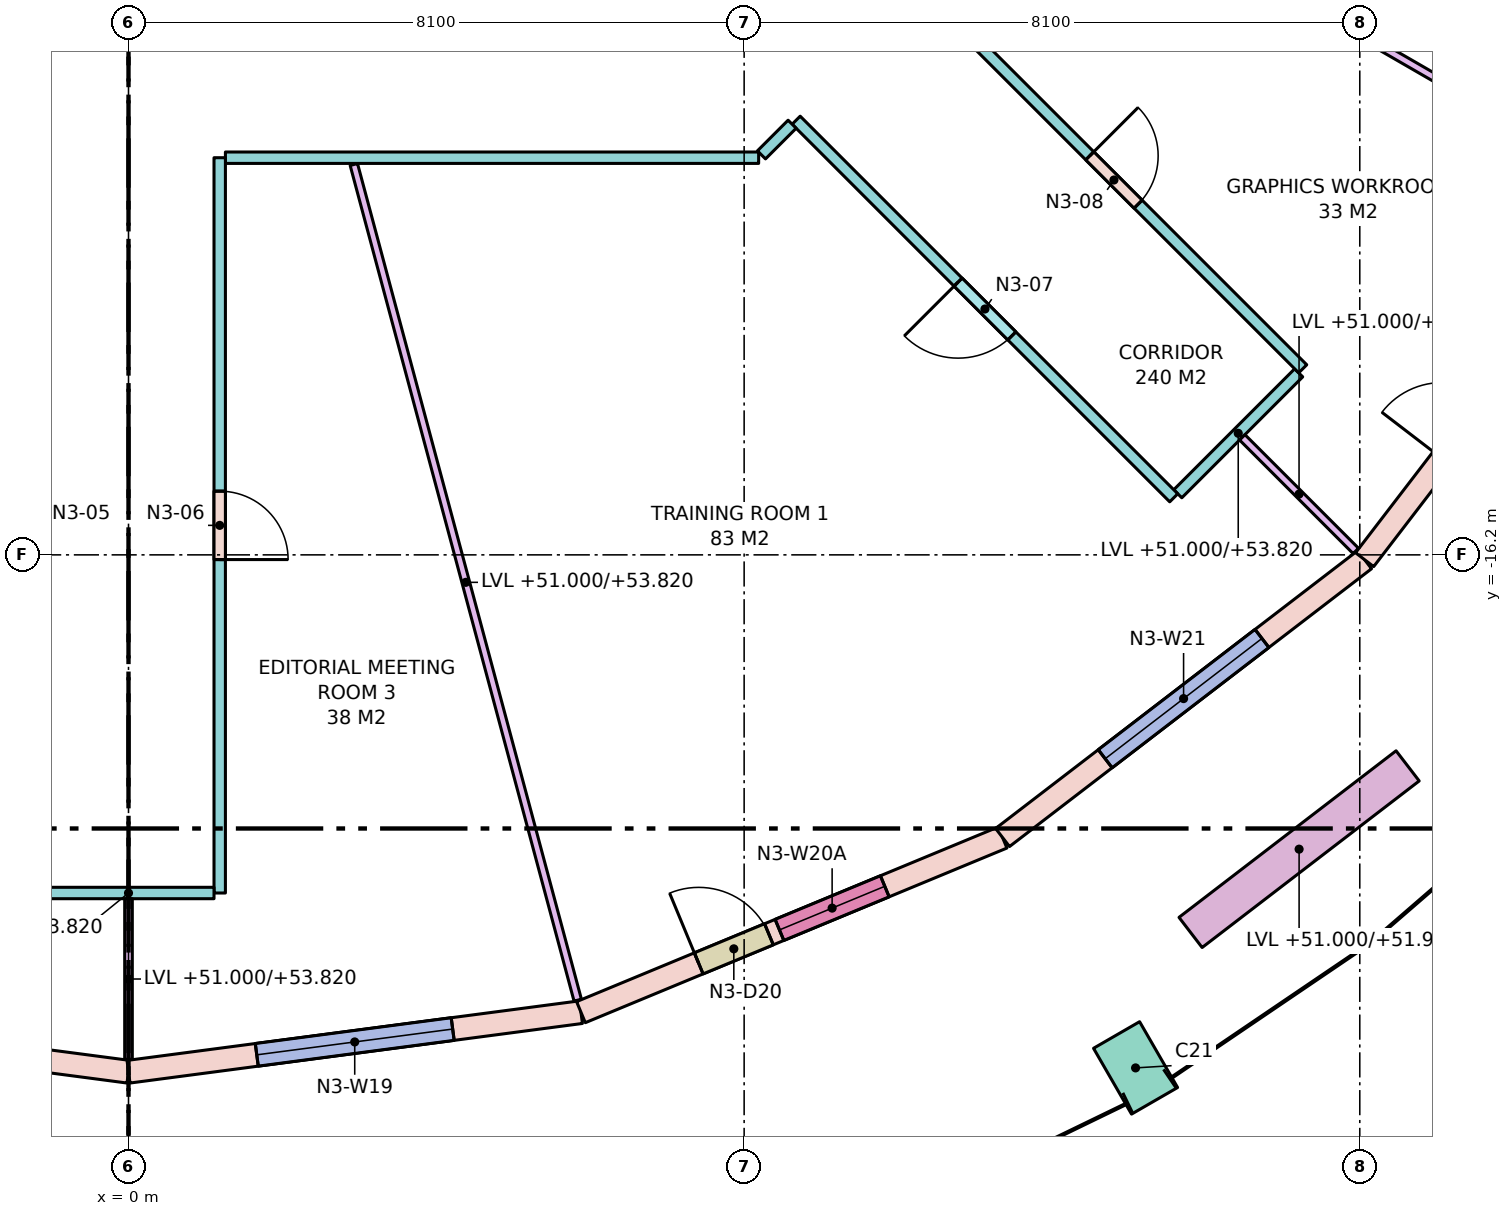
"""IFC4 building model, lengths in metres.
Left out: names, types, materials, properties, quantities, classifications, styles, units other than length and angle.
Written with IfcOpenShell. Run it as: python <this file> out.ifc"""

import sys

from ifc_helpers import new_model, si_unit, direction, frame, frame_2d, origin, origin_2d, place, context, subcontext, project, spatial, rectangle, extrude, element, fill, save


model = new_model("IFC4")
c1 = context("Model", 3, precision=1e-05, world=origin(), true_north=direction((0.0, 1.0)))
c2 = subcontext(c1, "Body", "Model", "MODEL_VIEW")
j1 = project(units=[si_unit("LENGTHUNIT", "METRE"), si_unit("PLANEANGLEUNIT", "RADIAN")], contexts=[c1])
p1 = place(None, origin())
s1 = spatial("IfcSite", under=j1, at=p1, CompositionType="ELEMENT")
p2 = place(p1, origin())
s2 = spatial("IfcBuilding", under=s1, at=p2, CompositionType="ELEMENT")
p3 = place(p2, frame((0.0, 0.0, 51.0)))
s3 = spatial("IfcBuildingStorey", under=s2, at=p3, CompositionType="ELEMENT", Elevation=51.0)
p4 = place(p3, frame((13.25, -22.95, 0.0), z_axis=(0.0, 0.0, 1.0), x_axis=(0.866025403784, 0.5, 0.0)))
e1 = element("IfcColumn", 1, at=p4, inside=s3, PredefinedType="COLUMN", context=c2, shape_type="SweptSolid", body=[
    extrude(rectangle(XDim=0.7, YDim=1.0, at=origin_2d()), origin(), (0.0, 0.0, 1.0), 4.0),
])
p5 = place(p3, frame((-5.953, -22.216, 0.0), z_axis=(0.0, 0.0, 1.0), x_axis=(0.991445297315, -0.130522880875, 0.0)))
e2 = element("IfcWall", 2, at=p5, inside=s3, PredefinedType="STANDARD", context=c2, shape_type="SweptSolid", body=[
    extrude(rectangle(XDim=6.004, YDim=0.3, at=frame_2d((3.002, 0.0))), origin(), (0.0, 0.0, 1.0), 3.72),
])
p6 = place(p5, frame((1.677, 0.0, 0.0)))
e3 = element("IfcOpeningElement", 3, at=p6, cuts=e2, PredefinedType="OPENING", context=c2, shape_type="SweptSolid", body=[
    extrude(rectangle(XDim=1.0, YDim=2.4, at=frame_2d((0.5, 1.2))), frame((0.0, 0.16, 0.0), z_axis=(0.0, -1.0, 0.0), x_axis=(1.0, 0.0, 0.0)), (0.0, 0.0, 1.0), 0.32),
])
p7 = place(p5, frame((2.827, 0.0, 0.8)))
e4 = element("IfcOpeningElement", 4, at=p7, cuts=e2, PredefinedType="OPENING", context=c2, shape_type="SweptSolid", body=[
    extrude(rectangle(XDim=1.5, YDim=2.7, at=frame_2d((0.75, 1.35))), frame((0.0, 0.16, 0.0), z_axis=(0.0, -1.0, 0.0), x_axis=(1.0, 0.0, 0.0)), (0.0, 0.0, 1.0), 0.32),
])
p8 = place(p3, frame((0.0, -23.0, 0.0), z_axis=(0.0, 0.0, 1.0), x_axis=(0.991445297315, 0.130522880875, 0.0)))
e5 = element("IfcWall", 5, at=p8, inside=s3, PredefinedType="STANDARD", context=c2, shape_type="SweptSolid", body=[
    extrude(rectangle(XDim=6.004, YDim=0.3, at=frame_2d((3.002, 0.0))), origin(), (0.0, 0.0, 1.0), 3.72),
])
p9 = place(p8, frame((1.702, 0.0, 0.8)))
e6 = element("IfcOpeningElement", 6, at=p9, cuts=e5, PredefinedType="OPENING", context=c2, shape_type="SweptSolid", body=[
    extrude(rectangle(XDim=2.6, YDim=2.7, at=frame_2d((1.3, 1.35))), frame((0.0, 0.16, 0.0), z_axis=(0.0, -1.0, 0.0), x_axis=(1.0, 0.0, 0.0)), (0.0, 0.0, 1.0), 0.32),
])
p10 = place(p3, frame((5.953, -22.216, 0.0), z_axis=(0.0, 0.0, 1.0), x_axis=(0.923884511653, 0.382671411433, 0.0)))
e7 = element("IfcWall", 7, at=p10, inside=s3, PredefinedType="STANDARD", context=c2, shape_type="SweptSolid", body=[
    extrude(rectangle(XDim=6.004, YDim=0.3, at=frame_2d((3.002, 0.0))), origin(), (0.0, 0.0, 1.0), 3.72),
])
p11 = place(p10, frame((1.677, 0.0, 0.0)))
e8 = element("IfcOpeningElement", 8, at=p11, cuts=e7, PredefinedType="OPENING", context=c2, shape_type="SweptSolid", body=[
    extrude(rectangle(XDim=1.0, YDim=2.4, at=frame_2d((0.5, 1.2))), frame((0.0, 0.16, 0.0), z_axis=(0.0, -1.0, 0.0), x_axis=(1.0, 0.0, 0.0)), (0.0, 0.0, 1.0), 0.32),
])
p12 = place(p10, frame((2.827, 0.0, 0.8)))
e9 = element("IfcOpeningElement", 9, at=p12, cuts=e7, PredefinedType="OPENING", context=c2, shape_type="SweptSolid", body=[
    extrude(rectangle(XDim=1.5, YDim=2.7, at=frame_2d((0.75, 1.35))), frame((0.0, 0.16, 0.0), z_axis=(0.0, -1.0, 0.0), x_axis=(1.0, 0.0, 0.0)), (0.0, 0.0, 1.0), 0.32),
])
p13 = place(p3, frame((11.5, -19.919, 0.0), z_axis=(0.0, 0.0, 1.0), x_axis=(0.793339924758, 0.608778912074, 0.0)))
e10 = element("IfcWall", 10, at=p13, inside=s3, PredefinedType="STANDARD", context=c2, shape_type="SweptSolid", body=[
    extrude(rectangle(XDim=6.004, YDim=0.3, at=frame_2d((3.002, 0.0))), origin(), (0.0, 0.0, 1.0), 3.72),
])
p14 = place(p13, frame((1.702, 0.0, 0.8)))
e11 = element("IfcOpeningElement", 11, at=p14, cuts=e10, PredefinedType="OPENING", context=c2, shape_type="SweptSolid", body=[
    extrude(rectangle(XDim=2.6, YDim=2.7, at=frame_2d((1.3, 1.35))), frame((0.0, 0.16, 0.0), z_axis=(0.0, -1.0, 0.0), x_axis=(1.0, 0.0, 0.0)), (0.0, 0.0, 1.0), 0.32),
])
p15 = place(p3, frame((16.263, -16.263, 0.0), z_axis=(0.0, 0.0, 1.0), x_axis=(0.608778912074, 0.793339924758, 0.0)))
e12 = element("IfcWall", 12, at=p15, inside=s3, PredefinedType="STANDARD", context=c2, shape_type="SweptSolid", body=[
    extrude(rectangle(XDim=6.004, YDim=0.3, at=frame_2d((3.002, 0.0))), origin(), (0.0, 0.0, 1.0), 3.72),
])
p16 = place(p15, frame((1.677, 0.0, 0.0)))
e13 = element("IfcOpeningElement", 13, at=p16, cuts=e12, PredefinedType="OPENING", context=c2, shape_type="SweptSolid", body=[
    extrude(rectangle(XDim=1.0, YDim=2.4, at=frame_2d((0.5, 1.2))), frame((0.0, 0.16, 0.0), z_axis=(0.0, -1.0, 0.0), x_axis=(1.0, 0.0, 0.0)), (0.0, 0.0, 1.0), 0.32),
])
p17 = place(p15, frame((2.827, 0.0, 0.8)))
e14 = element("IfcOpeningElement", 14, at=p17, cuts=e12, PredefinedType="OPENING", context=c2, shape_type="SweptSolid", body=[
    extrude(rectangle(XDim=1.5, YDim=2.7, at=frame_2d((0.75, 1.35))), frame((0.0, 0.16, 0.0), z_axis=(0.0, -1.0, 0.0), x_axis=(1.0, 0.0, 0.0)), (0.0, 0.0, 1.0), 0.32),
])
p18 = place(p3, frame((13.974, -21.167, 0.0), z_axis=(0.0, 0.0, 1.0), x_axis=(0.793359599829, 0.608753271334, 0.0)))
e15 = element("IfcWall", 15, at=p18, inside=s3, PredefinedType="PARAPET", context=c2, shape_type="SweptSolid", body=[
    extrude(rectangle(XDim=3.6, YDim=0.5, at=frame_2d((1.8, 0.0))), origin(), (0.0, 0.0, 1.0), 0.9),
])
p19 = place(p3, frame((15.396, -13.805, 0.0), z_axis=(0.0, 0.0, 1.0), x_axis=(-0.707106781187, -0.707106781187, 0.0)))
e16 = element("IfcWall", 16, at=p19, inside=s3, PredefinedType="PARTITIONING", context=c2, shape_type="SweptSolid", body=[
    extrude(rectangle(XDim=2.25, YDim=0.15, at=frame_2d((1.125, 0.0))), origin(), (0.0, 0.0, 1.0), 2.82),
])
p20 = place(p3, frame((13.752, -15.449, 0.0), z_axis=(0.0, 0.0, 1.0), x_axis=(-0.707089406061, 0.707124155885, 0.0)))
e17 = element("IfcWall", 17, at=p20, inside=s3, PredefinedType="PARTITIONING", context=c2, shape_type="SweptSolid", body=[
    extrude(rectangle(XDim=7.026, YDim=0.15, at=frame_2d((3.513, 0.0))), origin(), (0.0, 0.0, 1.0), 3.72),
])
p21 = place(p20, frame((3.013, 0.0, 0.0)))
e18 = element("IfcOpeningElement", 18, at=p21, cuts=e17, PredefinedType="OPENING", context=c2, shape_type="SweptSolid", body=[
    extrude(rectangle(XDim=1.0, YDim=2.1, at=frame_2d((0.5, 1.05))), frame((0.0, 0.085, 0.0), z_axis=(0.0, -1.0, 0.0), x_axis=(1.0, 0.0, 0.0)), (0.0, 0.0, 1.0), 0.17),
])
p22 = place(p3, frame((8.731, -10.534, 0.0), z_axis=(0.0, 0.0, 1.0), x_axis=(-0.707106781187, -0.707106781187, 0.0)))
e19 = element("IfcWall", 19, at=p22, inside=s3, PredefinedType="PARTITIONING", context=c2, shape_type="SweptSolid", body=[
    extrude(rectangle(XDim=0.571, YDim=0.15, at=frame_2d((0.285, 0.0))), origin(), (0.0, 0.0, 1.0), 3.72),
])
p23 = place(p3, frame((8.291, -10.975, 0.0), z_axis=(0.0, 0.0, 1.0), x_axis=(-1.0, 0.0, 0.0)))
e20 = element("IfcWall", 20, at=p23, inside=s3, PredefinedType="PARTITIONING", context=c2, shape_type="SweptSolid", body=[
    extrude(rectangle(XDim=7.016, YDim=0.15, at=frame_2d((3.508, 0.0))), origin(), (0.0, 0.0, 1.0), 2.82),
])
p24 = place(p3, frame((1.2, -10.975, 0.0), z_axis=(0.0, 0.0, 1.0), x_axis=(0.0, -1.0, 0.0)))
e21 = element("IfcWall", 21, at=p24, inside=s3, PredefinedType="PARTITIONING", context=c2, shape_type="SweptSolid", body=[
    extrude(rectangle(XDim=9.674, YDim=0.15, at=frame_2d((4.837, 0.0))), origin(), (0.0, 0.0, 1.0), 3.72),
])
p25 = place(p24, frame((4.387, 0.0, 0.0)))
e22 = element("IfcOpeningElement", 22, at=p25, cuts=e21, PredefinedType="OPENING", context=c2, shape_type="SweptSolid", body=[
    extrude(rectangle(XDim=0.9, YDim=2.1, at=frame_2d((0.45, 1.05))), frame((0.0, 0.085, 0.0), z_axis=(0.0, -1.0, 0.0), x_axis=(1.0, 0.0, 0.0)), (0.0, 0.0, 1.0), 0.17),
])
p26 = place(p3, frame((1.125, -20.649, 0.0), z_axis=(0.0, 0.0, 1.0), x_axis=(-1.0, 0.0, 0.0)))
e23 = element("IfcWall", 23, at=p26, inside=s3, PredefinedType="PARTITIONING", context=c2, shape_type="SweptSolid", body=[
    extrude(rectangle(XDim=2.25, YDim=0.15, at=frame_2d((1.125, 0.0))), origin(), (0.0, 0.0, 1.0), 2.82),
])
p27 = place(p3, frame((10.481, -8.784, 0.0), z_axis=(0.0, 0.0, 1.0), x_axis=(0.707124155885, -0.707089406061, 0.0)))
e24 = element("IfcWall", 24, at=p27, inside=s3, PredefinedType="PARTITIONING", context=c2, shape_type="SweptSolid", body=[
    extrude(rectangle(XDim=7.026, YDim=0.15, at=frame_2d((3.513, 0.0))), origin(), (0.0, 0.0, 1.0), 3.72),
])
p28 = place(p27, frame((3.063, 0.0, 0.0)))
e25 = element("IfcOpeningElement", 25, at=p28, cuts=e24, PredefinedType="OPENING", context=c2, shape_type="SweptSolid", body=[
    extrude(rectangle(XDim=0.9, YDim=2.1, at=frame_2d((0.45, 1.05))), frame((0.0, 0.085, 0.0), z_axis=(0.0, -1.0, 0.0), x_axis=(1.0, 0.0, 0.0)), (0.0, 0.0, 1.0), 0.17),
])
p29 = place(p3, frame((0.0, -20.724, 0.0), z_axis=(0.0, 0.0, 1.0), x_axis=(0.0, -1.0, 0.0)))
e26 = element("IfcWall", 26, at=p29, inside=s3, PredefinedType="PARTITIONING", context=c2, shape_type="SweptSolid", body=[
    extrude(rectangle(XDim=2.113, YDim=0.1, at=frame_2d((1.057, 0.0))), origin(), (0.0, 0.0, 1.0), 2.82),
])
p30 = place(p3, frame((2.965, -11.064, 0.0), z_axis=(0.0, 0.0, 1.0), x_axis=(0.258827930947, -0.965923445291, 0.0)))
e27 = element("IfcWall", 27, at=p30, inside=s3, PredefinedType="PARTITIONING", context=c2, shape_type="SweptSolid", body=[
    extrude(rectangle(XDim=11.382, YDim=0.1, at=frame_2d((5.691, 0.0))), origin(), (0.0, 0.0, 1.0), 2.82),
])
p31 = place(p3, frame((14.654, -14.654, 0.0), z_axis=(0.0, 0.0, 1.0), x_axis=(0.707106781187, -0.707106781187, 0.0)))
e28 = element("IfcWall", 28, at=p31, inside=s3, PredefinedType="PARTITIONING", context=c2, shape_type="SweptSolid", body=[
    extrude(rectangle(XDim=2.113, YDim=0.1, at=frame_2d((1.057, 0.0))), origin(), (0.0, 0.0, 1.0), 2.82),
])
p32 = place(p3, frame((12.294, -7.098, 0.0), z_axis=(0.0, 0.0, 1.0), x_axis=(0.866010547425, -0.500025731086, 0.0)))
e29 = element("IfcWall", 29, at=p32, inside=s3, PredefinedType="PARTITIONING", context=c2, shape_type="SweptSolid", body=[
    extrude(rectangle(XDim=8.641, YDim=0.1, at=frame_2d((4.32, 0.0))), origin(), (0.0, 0.0, 1.0), 2.82),
])
p33 = place(p9, origin())
e30 = element("IfcWindow", 30, at=p33, inside=s3, PartitioningType="SINGLE_PANEL", PredefinedType="WINDOW", context=c2, shape_type="SweptSolid", body=[
    extrude(rectangle(XDim=2.6, YDim=2.7, at=frame_2d((1.3, 1.35))), frame((0.0, 0.03, 0.0), z_axis=(0.0, -1.0, 0.0), x_axis=(1.0, 0.0, 0.0)), (0.0, 0.0, 1.0), 0.06),
])
fill(e6, e30)
p34 = place(p11, origin())
e31 = element("IfcDoor", 31, at=p34, inside=s3, OperationType="SINGLE_SWING_LEFT", PredefinedType="DOOR", context=c2, shape_type="SweptSolid", body=[
    extrude(rectangle(XDim=1.0, YDim=2.4, at=frame_2d((0.5, 1.2))), frame((0.0, 0.025, 0.0), z_axis=(0.0, -1.0, 0.0), x_axis=(1.0, 0.0, 0.0)), (0.0, 0.0, 1.0), 0.05),
])
fill(e8, e31)
p35 = place(p12, origin())
e32 = element("IfcWindow", 32, at=p35, inside=s3, PartitioningType="SINGLE_PANEL", PredefinedType="WINDOW", context=c2, shape_type="SweptSolid", body=[
    extrude(rectangle(XDim=1.5, YDim=2.7, at=frame_2d((0.75, 1.35))), frame((0.0, 0.03, 0.0), z_axis=(0.0, -1.0, 0.0), x_axis=(1.0, 0.0, 0.0)), (0.0, 0.0, 1.0), 0.06),
])
fill(e9, e32)
p36 = place(p14, origin())
e33 = element("IfcWindow", 33, at=p36, inside=s3, PartitioningType="SINGLE_PANEL", PredefinedType="WINDOW", context=c2, shape_type="SweptSolid", body=[
    extrude(rectangle(XDim=2.6, YDim=2.7, at=frame_2d((1.3, 1.35))), frame((0.0, 0.03, 0.0), z_axis=(0.0, -1.0, 0.0), x_axis=(1.0, 0.0, 0.0)), (0.0, 0.0, 1.0), 0.06),
])
fill(e11, e33)
p37 = place(p25, origin())
e34 = element("IfcDoor", 34, at=p37, inside=s3, OperationType="SINGLE_SWING_RIGHT", PredefinedType="DOOR", context=c2, shape_type="SweptSolid", body=[
    extrude(rectangle(XDim=0.9, YDim=2.1, at=frame_2d((0.45, 1.05))), frame((0.0, 0.025, 0.0), z_axis=(0.0, -1.0, 0.0), x_axis=(1.0, 0.0, 0.0)), (0.0, 0.0, 1.0), 0.05),
])
fill(e22, e34)
p38 = place(p21, origin())
e35 = element("IfcDoor", 35, at=p38, inside=s3, OperationType="SINGLE_SWING_RIGHT", PredefinedType="DOOR", context=c2, shape_type="SweptSolid", body=[
    extrude(rectangle(XDim=1.0, YDim=2.1, at=frame_2d((0.5, 1.05))), frame((0.0, 0.025, 0.0), z_axis=(0.0, -1.0, 0.0), x_axis=(1.0, 0.0, 0.0)), (0.0, 0.0, 1.0), 0.05),
])
fill(e18, e35)
p39 = place(p28, origin())
e36 = element("IfcDoor", 36, at=p39, inside=s3, OperationType="SINGLE_SWING_LEFT", PredefinedType="DOOR", context=c2, shape_type="SweptSolid", body=[
    extrude(rectangle(XDim=0.9, YDim=2.1, at=frame_2d((0.45, 1.05))), frame((0.0, 0.025, 0.0), z_axis=(0.0, -1.0, 0.0), x_axis=(1.0, 0.0, 0.0)), (0.0, 0.0, 1.0), 0.05),
])
fill(e25, e36)
save(model, sys.argv[1])
